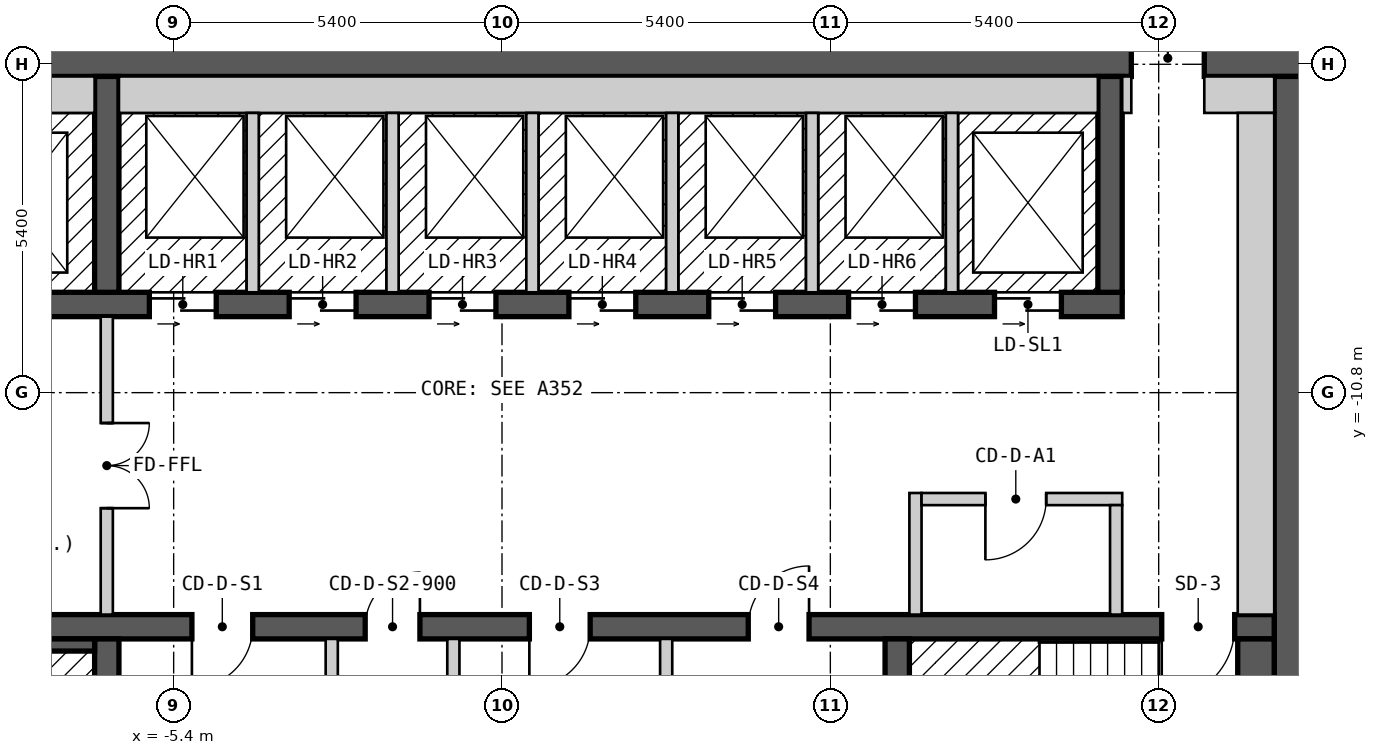
"""IFC4 building model, lengths in metres.
Left out: names, types, materials, properties, quantities, classifications, styles, units other than length and angle.
Written with IfcOpenShell. Run it as: python <this file> out.ifc"""

import sys

from ifc_helpers import new_model, si_unit, direction, frame, frame_2d, origin, place, context, subcontext, project, spatial, rectangle, extrude, element, fill, save


model = new_model("IFC4")
c1 = context("Model", 3, precision=1e-05, world=origin(), true_north=direction((0.0, 1.0)))
c2 = subcontext(c1, "Body", "Model", "MODEL_VIEW")
j1 = project(units=[si_unit("LENGTHUNIT", "METRE"), si_unit("PLANEANGLEUNIT", "RADIAN")], contexts=[c1])
p1 = place(None, origin())
s1 = spatial("IfcSite", under=j1, at=p1, CompositionType="ELEMENT")
p2 = place(p1, origin())
s2 = spatial("IfcBuilding", under=s1, at=p2, CompositionType="ELEMENT")
p3 = place(p2, frame((0.0, 0.0, 190.2)))
s3 = spatial("IfcBuildingStorey", under=s2, at=p3, CompositionType="ELEMENT", Elevation=190.2)
p4 = place(p3, frame((-13.3, -5.3, 0.0), z_axis=(0.0, 0.0, 1.0), x_axis=(1.0, 0.0, 0.0)))
e1 = element("IfcWall", 1, at=p4, inside=s3, PredefinedType="SHEAR", context=c2, shape_type="SweptSolid", body=[
    extrude(rectangle(XDim=26.6, YDim=0.6, at=frame_2d((13.3, 0.0))), origin(), (0.0, 0.0, 1.0), 2.7),
])
p5 = place(p4, frame((23.65, 0.0, 0.0)))
e2 = element("IfcOpeningElement", 2, at=p5, cuts=e1, PredefinedType="OPENING", context=c2, shape_type="SweptSolid", body=[
    extrude(rectangle(XDim=1.2, YDim=2.1, at=frame_2d((0.6, 1.05))), frame((0.0, 0.31, 0.0), z_axis=(0.0, -1.0, 0.0), x_axis=(1.0, 0.0, 0.0)), (0.0, 0.0, 1.0), 0.62),
])
p6 = place(p3, frame((13.0, -18.4, 0.0), z_axis=(0.0, 0.0, 1.0), x_axis=(0.0, 1.0, 0.0)))
e3 = element("IfcWall", 3, at=p6, inside=s3, PredefinedType="SHEAR", context=c2, shape_type="SweptSolid", body=[
    extrude(rectangle(XDim=12.8, YDim=0.6, at=frame_2d((6.4, 0.0))), origin(), (0.0, 0.0, 1.0), 2.7),
])
p7 = place(p3, frame((-12.7, -14.65, 0.0), z_axis=(0.0, 0.0, 1.0), x_axis=(1.0, 0.0, 0.0)))
e4 = element("IfcWall", 4, at=p7, inside=s3, PredefinedType="SHEAR", context=c2, shape_type="SweptSolid", body=[
    extrude(rectangle(XDim=25.4, YDim=0.4, at=frame_2d((12.7, 0.0))), origin(), (0.0, 0.0, 1.0), 2.7),
])
p8 = place(p7, frame((1.9, 0.0, 0.0), z_axis=(0.0, 0.0, 1.0), x_axis=(-1.0, 0.0, 0.0)))
e5 = element("IfcOpeningElement", 5, at=p8, cuts=e4, PredefinedType="OPENING", context=c2, shape_type="SweptSolid", body=[
    extrude(rectangle(XDim=1.2, YDim=2.1, at=frame_2d((0.6, 1.05))), frame((0.0, 0.21, 0.0), z_axis=(0.0, -1.0, 0.0), x_axis=(1.0, 0.0, 0.0)), (0.0, 0.0, 1.0), 0.42),
])
p9 = place(p7, frame((24.75, 0.0, 0.0), z_axis=(0.0, 0.0, 1.0), x_axis=(-1.0, 0.0, 0.0)))
e6 = element("IfcOpeningElement", 6, at=p9, cuts=e4, PredefinedType="OPENING", context=c2, shape_type="SweptSolid", body=[
    extrude(rectangle(XDim=1.2, YDim=2.1, at=frame_2d((0.6, 1.05))), frame((0.0, 0.21, 0.0), z_axis=(0.0, -1.0, 0.0), x_axis=(1.0, 0.0, 0.0)), (0.0, 0.0, 1.0), 0.42),
])
p10 = place(p7, frame((8.6, 0.0, 0.0), z_axis=(0.0, 0.0, 1.0), x_axis=(-1.0, 0.0, 0.0)))
e7 = element("IfcOpeningElement", 7, at=p10, cuts=e4, PredefinedType="OPENING", context=c2, shape_type="SweptSolid", body=[
    extrude(rectangle(XDim=1.0, YDim=2.1, at=frame_2d((0.5, 1.05))), frame((0.0, 0.21, 0.0), z_axis=(0.0, -1.0, 0.0), x_axis=(1.0, 0.0, 0.0)), (0.0, 0.0, 1.0), 0.42),
])
p11 = place(p7, frame((11.35, 0.0, 0.0), z_axis=(0.0, 0.0, 1.0), x_axis=(-1.0, 0.0, 0.0)))
e8 = element("IfcOpeningElement", 8, at=p11, cuts=e4, PredefinedType="OPENING", context=c2, shape_type="SweptSolid", body=[
    extrude(rectangle(XDim=0.9, YDim=2.1, at=frame_2d((0.45, 1.05))), frame((0.0, 0.21, 0.0), z_axis=(0.0, -1.0, 0.0), x_axis=(1.0, 0.0, 0.0)), (0.0, 0.0, 1.0), 0.42),
])
p12 = place(p7, frame((14.15, 0.0, 0.0), z_axis=(0.0, 0.0, 1.0), x_axis=(-1.0, 0.0, 0.0)))
e9 = element("IfcOpeningElement", 9, at=p12, cuts=e4, PredefinedType="OPENING", context=c2, shape_type="SweptSolid", body=[
    extrude(rectangle(XDim=1.0, YDim=2.1, at=frame_2d((0.5, 1.05))), frame((0.0, 0.21, 0.0), z_axis=(0.0, -1.0, 0.0), x_axis=(1.0, 0.0, 0.0)), (0.0, 0.0, 1.0), 0.42),
])
p13 = place(p7, frame((17.75, 0.0, 0.0), z_axis=(0.0, 0.0, 1.0), x_axis=(-1.0, 0.0, 0.0)))
e10 = element("IfcOpeningElement", 10, at=p13, cuts=e4, PredefinedType="OPENING", context=c2, shape_type="SweptSolid", body=[
    extrude(rectangle(XDim=1.0, YDim=2.1, at=frame_2d((0.5, 1.05))), frame((0.0, 0.21, 0.0), z_axis=(0.0, -1.0, 0.0), x_axis=(1.0, 0.0, 0.0)), (0.0, 0.0, 1.0), 0.42),
])
p14 = place(p3, frame((-12.7, -9.35, 0.0), z_axis=(0.0, 0.0, 1.0), x_axis=(1.0, 0.0, 0.0)))
e11 = element("IfcWall", 11, at=p14, inside=s3, PredefinedType="SHEAR", context=c2, shape_type="SweptSolid", body=[
    extrude(rectangle(XDim=22.9, YDim=0.4, at=frame_2d((11.45, 0.0))), origin(), (0.0, 0.0, 1.0), 2.7),
])
p15 = place(p14, frame((1.3, 0.0, 0.0)))
e12 = element("IfcOpeningElement", 12, at=p15, cuts=e11, PredefinedType="OPENING", context=c2, shape_type="SweptSolid", body=[
    extrude(rectangle(XDim=1.1, YDim=2.1, at=frame_2d((0.55, 1.05))), frame((0.0, 0.21, 0.0), z_axis=(0.0, -1.0, 0.0), x_axis=(1.0, 0.0, 0.0)), (0.0, 0.0, 1.0), 0.42),
])
p16 = place(p14, frame((4.1, 0.0, 0.0)))
e13 = element("IfcOpeningElement", 13, at=p16, cuts=e11, PredefinedType="OPENING", context=c2, shape_type="SweptSolid", body=[
    extrude(rectangle(XDim=1.1, YDim=2.1, at=frame_2d((0.55, 1.05))), frame((0.0, 0.21, 0.0), z_axis=(0.0, -1.0, 0.0), x_axis=(1.0, 0.0, 0.0)), (0.0, 0.0, 1.0), 0.42),
])
p17 = place(p14, frame((6.9, 0.0, 0.0)))
e14 = element("IfcOpeningElement", 14, at=p17, cuts=e11, PredefinedType="OPENING", context=c2, shape_type="SweptSolid", body=[
    extrude(rectangle(XDim=1.1, YDim=2.1, at=frame_2d((0.55, 1.05))), frame((0.0, 0.21, 0.0), z_axis=(0.0, -1.0, 0.0), x_axis=(1.0, 0.0, 0.0)), (0.0, 0.0, 1.0), 0.42),
])
p18 = place(p14, frame((9.2, 0.0, 0.0)))
e15 = element("IfcOpeningElement", 15, at=p18, cuts=e11, PredefinedType="OPENING", context=c2, shape_type="SweptSolid", body=[
    extrude(rectangle(XDim=1.1, YDim=2.1, at=frame_2d((0.55, 1.05))), frame((0.0, 0.21, 0.0), z_axis=(0.0, -1.0, 0.0), x_axis=(1.0, 0.0, 0.0)), (0.0, 0.0, 1.0), 0.42),
])
p19 = place(p14, frame((11.5, 0.0, 0.0)))
e16 = element("IfcOpeningElement", 16, at=p19, cuts=e11, PredefinedType="OPENING", context=c2, shape_type="SweptSolid", body=[
    extrude(rectangle(XDim=1.1, YDim=2.1, at=frame_2d((0.55, 1.05))), frame((0.0, 0.21, 0.0), z_axis=(0.0, -1.0, 0.0), x_axis=(1.0, 0.0, 0.0)), (0.0, 0.0, 1.0), 0.42),
])
p20 = place(p14, frame((13.8, 0.0, 0.0)))
e17 = element("IfcOpeningElement", 17, at=p20, cuts=e11, PredefinedType="OPENING", context=c2, shape_type="SweptSolid", body=[
    extrude(rectangle(XDim=1.1, YDim=2.1, at=frame_2d((0.55, 1.05))), frame((0.0, 0.21, 0.0), z_axis=(0.0, -1.0, 0.0), x_axis=(1.0, 0.0, 0.0)), (0.0, 0.0, 1.0), 0.42),
])
p21 = place(p14, frame((16.1, 0.0, 0.0)))
e18 = element("IfcOpeningElement", 18, at=p21, cuts=e11, PredefinedType="OPENING", context=c2, shape_type="SweptSolid", body=[
    extrude(rectangle(XDim=1.1, YDim=2.1, at=frame_2d((0.55, 1.05))), frame((0.0, 0.21, 0.0), z_axis=(0.0, -1.0, 0.0), x_axis=(1.0, 0.0, 0.0)), (0.0, 0.0, 1.0), 0.42),
])
p22 = place(p14, frame((18.4, 0.0, 0.0)))
e19 = element("IfcOpeningElement", 19, at=p22, cuts=e11, PredefinedType="OPENING", context=c2, shape_type="SweptSolid", body=[
    extrude(rectangle(XDim=1.1, YDim=2.1, at=frame_2d((0.55, 1.05))), frame((0.0, 0.21, 0.0), z_axis=(0.0, -1.0, 0.0), x_axis=(1.0, 0.0, 0.0)), (0.0, 0.0, 1.0), 0.42),
])
p23 = place(p14, frame((20.8, 0.0, 0.0)))
e20 = element("IfcOpeningElement", 20, at=p23, cuts=e11, PredefinedType="OPENING", context=c2, shape_type="SweptSolid", body=[
    extrude(rectangle(XDim=1.1, YDim=2.1, at=frame_2d((0.55, 1.05))), frame((0.0, 0.21, 0.0), z_axis=(0.0, -1.0, 0.0), x_axis=(1.0, 0.0, 0.0)), (0.0, 0.0, 1.0), 0.42),
])
for number, where, z_axis, x_axis in (
    (21, (-6.5, -18.4, 0.0), (0.0, 0.0, 1.0), (0.0, 1.0, 0.0)),
    (22, (6.5, -18.4, 0.0), (0.0, 0.0, 1.0), (0.0, 1.0, 0.0)),
    (23, (-6.5, -9.15, 0.0), (0.0, 0.0, 1.0), (0.0, 1.0, 0.0)),
    (24, (10.0, -9.15, 0.0), (0.0, 0.0, 1.0), (0.0, 1.0, 0.0)),
):
    element("IfcWall", number, at=place(p3, frame(where, z_axis=z_axis, x_axis=x_axis)), inside=s3, PredefinedType="SHEAR", context=c2, shape_type="SweptSolid", body=[
        extrude(rectangle(XDim=3.55, YDim=0.4, at=frame_2d((1.775, 0.0))), origin(), (0.0, 0.0, 1.0), 2.7),
    ])
p24 = place(p3, frame((-12.1, -5.9, 0.0), z_axis=(0.0, 0.0, 1.0), x_axis=(1.0, 0.0, 0.0)))
e25 = element("IfcWall", 25, at=p24, inside=s3, PredefinedType="SOLIDWALL", context=c2, shape_type="SweptSolid", body=[
    extrude(rectangle(XDim=5.4, YDim=0.6, at=frame_2d((2.7, 0.0))), origin(), (0.0, 0.0, 1.0), 2.7),
])
p25 = place(p3, frame((-10.8, -14.95, 0.0), z_axis=(0.0, 0.0, 1.0), x_axis=(1.0, 0.0, 0.0)))
e26 = element("IfcWall", 26, at=p25, inside=s3, PredefinedType="SOLIDWALL", context=c2, shape_type="SweptSolid", body=[
    extrude(rectangle(XDim=4.1, YDim=0.2, at=frame_2d((2.05, 0.0))), origin(), (0.0, 0.0, 1.0), 2.7),
])
p26 = place(p3, frame((-6.5, -14.45, 0.0), z_axis=(0.0, 0.0, 1.0), x_axis=(0.0, 1.0, 0.0)))
e27 = element("IfcWall", 27, at=p26, inside=s3, PredefinedType="PARTITIONING", context=c2, shape_type="SweptSolid", body=[
    extrude(rectangle(XDim=4.9, YDim=0.2, at=frame_2d((2.45, 0.0))), origin(), (0.0, 0.0, 1.0), 2.7),
])
p27 = place(p26, frame((3.15, 0.0, 0.0), z_axis=(0.0, 0.0, 1.0), x_axis=(-1.0, 0.0, 0.0)))
e28 = element("IfcOpeningElement", 28, at=p27, cuts=e27, PredefinedType="OPENING", context=c2, shape_type="SweptSolid", body=[
    extrude(rectangle(XDim=1.4, YDim=2.1, at=frame_2d((0.7, 1.05))), frame((0.0, 0.11, 0.0), z_axis=(0.0, -1.0, 0.0), x_axis=(1.0, 0.0, 0.0)), (0.0, 0.0, 1.0), 0.22),
])
p28 = place(p3, frame((-6.3, -5.9, 0.0), z_axis=(0.0, 0.0, 1.0), x_axis=(1.0, 0.0, 0.0)))
e29 = element("IfcWall", 29, at=p28, inside=s3, PredefinedType="SOLIDWALL", context=c2, shape_type="SweptSolid", body=[
    extrude(rectangle(XDim=16.1, YDim=0.6, at=frame_2d((8.05, 0.0))), origin(), (0.0, 0.0, 1.0), 2.7),
])
p29 = place(p3, frame((-4.1, -9.15, 0.0), z_axis=(0.0, 0.0, 1.0), x_axis=(0.0, 1.0, 0.0)))
e30 = element("IfcWall", 30, at=p29, inside=s3, PredefinedType="SOLIDWALL", context=c2, shape_type="SweptSolid", body=[
    extrude(rectangle(XDim=2.95, YDim=0.2, at=frame_2d((1.475, 0.0))), origin(), (0.0, 0.0, 1.0), 2.7),
])
p30 = place(p3, frame((-2.8, -17.8, 0.0), z_axis=(0.0, 0.0, 1.0), x_axis=(0.0, 1.0, 0.0)))
e31 = element("IfcWall", 31, at=p30, inside=s3, PredefinedType="PARTITIONING", context=c2, shape_type="SweptSolid", body=[
    extrude(rectangle(XDim=2.95, YDim=0.2, at=frame_2d((1.475, 0.0))), origin(), (0.0, 0.0, 1.0), 2.7),
])
p31 = place(p3, frame((-1.8, -9.15, 0.0), z_axis=(0.0, 0.0, 1.0), x_axis=(0.0, 1.0, 0.0)))
e32 = element("IfcWall", 32, at=p31, inside=s3, PredefinedType="SOLIDWALL", context=c2, shape_type="SweptSolid", body=[
    extrude(rectangle(XDim=2.95, YDim=0.2, at=frame_2d((1.475, 0.0))), origin(), (0.0, 0.0, 1.0), 2.7),
])
p32 = place(p3, frame((-0.8, -17.8, 0.0), z_axis=(0.0, 0.0, 1.0), x_axis=(0.0, 1.0, 0.0)))
e33 = element("IfcWall", 33, at=p32, inside=s3, PredefinedType="PARTITIONING", context=c2, shape_type="SweptSolid", body=[
    extrude(rectangle(XDim=2.95, YDim=0.2, at=frame_2d((1.475, 0.0))), origin(), (0.0, 0.0, 1.0), 2.7),
])
p33 = place(p3, frame((0.5, -9.15, 0.0), z_axis=(0.0, 0.0, 1.0), x_axis=(0.0, 1.0, 0.0)))
e34 = element("IfcWall", 34, at=p33, inside=s3, PredefinedType="SOLIDWALL", context=c2, shape_type="SweptSolid", body=[
    extrude(rectangle(XDim=2.95, YDim=0.2, at=frame_2d((1.475, 0.0))), origin(), (0.0, 0.0, 1.0), 2.7),
])
p34 = place(p3, frame((2.7, -17.8, 0.0), z_axis=(0.0, 0.0, 1.0), x_axis=(0.0, 1.0, 0.0)))
e35 = element("IfcWall", 35, at=p34, inside=s3, PredefinedType="PARTITIONING", context=c2, shape_type="SweptSolid", body=[
    extrude(rectangle(XDim=2.95, YDim=0.2, at=frame_2d((1.475, 0.0))), origin(), (0.0, 0.0, 1.0), 2.7),
])
for number, where, z_axis, x_axis in (
    (36, (2.8, -9.15, 0.0), (0.0, 0.0, 1.0), (0.0, 1.0, 0.0)),
    (37, (5.1, -9.15, 0.0), (0.0, 0.0, 1.0), (0.0, 1.0, 0.0)),
):
    element("IfcWall", number, at=place(p3, frame(where, z_axis=z_axis, x_axis=x_axis)), inside=s3, PredefinedType="SOLIDWALL", context=c2, shape_type="SweptSolid", body=[
        extrude(rectangle(XDim=2.95, YDim=0.2, at=frame_2d((1.475, 0.0))), origin(), (0.0, 0.0, 1.0), 2.7),
    ])
p35 = place(p3, frame((6.8, -14.45, 0.0), z_axis=(0.0, 0.0, 1.0), x_axis=(0.0, 1.0, 0.0)))
e38 = element("IfcWall", 38, at=p35, inside=s3, PredefinedType="PARTITIONING", context=c2, shape_type="SweptSolid", body=[
    extrude(rectangle(XDim=2.0, YDim=0.2, at=frame_2d((1.0, 0.0))), origin(), (0.0, 0.0, 1.0), 2.7),
])
p36 = place(p3, frame((6.9, -12.55, 0.0), z_axis=(0.0, 0.0, 1.0), x_axis=(1.0, 0.0, 0.0)))
e39 = element("IfcWall", 39, at=p36, inside=s3, PredefinedType="PARTITIONING", context=c2, shape_type="SweptSolid", body=[
    extrude(rectangle(XDim=3.3, YDim=0.2, at=frame_2d((1.65, 0.0))), origin(), (0.0, 0.0, 1.0), 2.7),
])
p37 = place(p36, frame((2.05, 0.0, 0.0), z_axis=(0.0, 0.0, 1.0), x_axis=(-1.0, 0.0, 0.0)))
e40 = element("IfcOpeningElement", 40, at=p37, cuts=e39, PredefinedType="OPENING", context=c2, shape_type="SweptSolid", body=[
    extrude(rectangle(XDim=1.0, YDim=2.1, at=frame_2d((0.5, 1.05))), frame((0.0, 0.11, 0.0), z_axis=(0.0, -1.0, 0.0), x_axis=(1.0, 0.0, 0.0)), (0.0, 0.0, 1.0), 0.22),
])
p38 = place(p3, frame((7.4, -9.15, 0.0), z_axis=(0.0, 0.0, 1.0), x_axis=(0.0, 1.0, 0.0)))
e41 = element("IfcWall", 41, at=p38, inside=s3, PredefinedType="SOLIDWALL", context=c2, shape_type="SweptSolid", body=[
    extrude(rectangle(XDim=2.95, YDim=0.2, at=frame_2d((1.475, 0.0))), origin(), (0.0, 0.0, 1.0), 2.7),
])
p39 = place(p3, frame((10.1, -14.45, 0.0), z_axis=(0.0, 0.0, 1.0), x_axis=(0.0, 1.0, 0.0)))
e42 = element("IfcWall", 42, at=p39, inside=s3, PredefinedType="PARTITIONING", context=c2, shape_type="SweptSolid", body=[
    extrude(rectangle(XDim=1.8, YDim=0.2, at=frame_2d((0.9, 0.0))), origin(), (0.0, 0.0, 1.0), 2.7),
])
p40 = place(p3, frame((10.275, -6.2, 0.0), z_axis=(0.0, 0.0, 1.0), x_axis=(0.0, 1.0, 0.0)))
e43 = element("IfcWall", 43, at=p40, inside=s3, PredefinedType="PARTITIONING", context=c2, shape_type="SweptSolid", body=[
    extrude(rectangle(XDim=0.6, YDim=0.15, at=frame_2d((0.3, 0.0))), origin(), (0.0, 0.0, 1.0), 2.7),
])
p41 = place(p3, frame((11.55, -5.9, 0.0), z_axis=(0.0, 0.0, 1.0), x_axis=(1.0, 0.0, 0.0)))
e44 = element("IfcWall", 44, at=p41, inside=s3, PredefinedType="PARTITIONING", context=c2, shape_type="SweptSolid", body=[
    extrude(rectangle(XDim=1.15, YDim=0.6, at=frame_2d((0.575, 0.0))), origin(), (0.0, 0.0, 1.0), 2.7),
])
p42 = place(p3, frame((12.4, -17.6, 0.0), z_axis=(0.0, 0.0, 1.0), x_axis=(0.0, 1.0, 0.0)))
e45 = element("IfcWall", 45, at=p42, inside=s3, PredefinedType="SOLIDWALL", context=c2, shape_type="SweptSolid", body=[
    extrude(rectangle(XDim=2.75, YDim=0.6, at=frame_2d((1.375, 0.0))), origin(), (0.0, 0.0, 1.0), 2.7),
])
p43 = place(p3, frame((12.4, -14.45, 0.0), z_axis=(0.0, 0.0, 1.0), x_axis=(0.0, 1.0, 0.0)))
e46 = element("IfcWall", 46, at=p43, inside=s3, PredefinedType="PARTITIONING", context=c2, shape_type="SweptSolid", body=[
    extrude(rectangle(XDim=8.25, YDim=0.6, at=frame_2d((4.125, 0.0))), origin(), (0.0, 0.0, 1.0), 2.7),
])
p44 = place(p17, origin())
e47 = element("IfcDoor", 47, at=p44, inside=s3, OperationType="DOUBLE_DOOR_SLIDING", PredefinedType="DOOR", context=c2, shape_type="SweptSolid", body=[
    extrude(rectangle(XDim=1.1, YDim=2.1, at=frame_2d((0.55, 1.05))), frame((0.0, 0.025, 0.0), z_axis=(0.0, -1.0, 0.0), x_axis=(1.0, 0.0, 0.0)), (0.0, 0.0, 1.0), 0.05),
])
fill(e14, e47)
p45 = place(p18, origin())
e48 = element("IfcDoor", 48, at=p45, inside=s3, OperationType="DOUBLE_DOOR_SLIDING", PredefinedType="DOOR", context=c2, shape_type="SweptSolid", body=[
    extrude(rectangle(XDim=1.1, YDim=2.1, at=frame_2d((0.55, 1.05))), frame((0.0, 0.025, 0.0), z_axis=(0.0, -1.0, 0.0), x_axis=(1.0, 0.0, 0.0)), (0.0, 0.0, 1.0), 0.05),
])
fill(e15, e48)
p46 = place(p19, origin())
e49 = element("IfcDoor", 49, at=p46, inside=s3, OperationType="DOUBLE_DOOR_SLIDING", PredefinedType="DOOR", context=c2, shape_type="SweptSolid", body=[
    extrude(rectangle(XDim=1.1, YDim=2.1, at=frame_2d((0.55, 1.05))), frame((0.0, 0.025, 0.0), z_axis=(0.0, -1.0, 0.0), x_axis=(1.0, 0.0, 0.0)), (0.0, 0.0, 1.0), 0.05),
])
fill(e16, e49)
p47 = place(p20, origin())
e50 = element("IfcDoor", 50, at=p47, inside=s3, OperationType="DOUBLE_DOOR_SLIDING", PredefinedType="DOOR", context=c2, shape_type="SweptSolid", body=[
    extrude(rectangle(XDim=1.1, YDim=2.1, at=frame_2d((0.55, 1.05))), frame((0.0, 0.025, 0.0), z_axis=(0.0, -1.0, 0.0), x_axis=(1.0, 0.0, 0.0)), (0.0, 0.0, 1.0), 0.05),
])
fill(e17, e50)
p48 = place(p21, origin())
e51 = element("IfcDoor", 51, at=p48, inside=s3, OperationType="DOUBLE_DOOR_SLIDING", PredefinedType="DOOR", context=c2, shape_type="SweptSolid", body=[
    extrude(rectangle(XDim=1.1, YDim=2.1, at=frame_2d((0.55, 1.05))), frame((0.0, 0.025, 0.0), z_axis=(0.0, -1.0, 0.0), x_axis=(1.0, 0.0, 0.0)), (0.0, 0.0, 1.0), 0.05),
])
fill(e18, e51)
p49 = place(p22, origin())
e52 = element("IfcDoor", 52, at=p49, inside=s3, OperationType="DOUBLE_DOOR_SLIDING", PredefinedType="DOOR", context=c2, shape_type="SweptSolid", body=[
    extrude(rectangle(XDim=1.1, YDim=2.1, at=frame_2d((0.55, 1.05))), frame((0.0, 0.025, 0.0), z_axis=(0.0, -1.0, 0.0), x_axis=(1.0, 0.0, 0.0)), (0.0, 0.0, 1.0), 0.05),
])
fill(e19, e52)
p50 = place(p23, origin())
e53 = element("IfcDoor", 53, at=p50, inside=s3, OperationType="DOUBLE_DOOR_SLIDING", PredefinedType="DOOR", context=c2, shape_type="SweptSolid", body=[
    extrude(rectangle(XDim=1.1, YDim=2.1, at=frame_2d((0.55, 1.05))), frame((0.0, 0.025, 0.0), z_axis=(0.0, -1.0, 0.0), x_axis=(1.0, 0.0, 0.0)), (0.0, 0.0, 1.0), 0.05),
])
fill(e20, e53)
p51 = place(p9, origin())
e54 = element("IfcDoor", 54, at=p51, inside=s3, OperationType="SINGLE_SWING_RIGHT", PredefinedType="DOOR", context=c2, shape_type="SweptSolid", body=[
    extrude(rectangle(XDim=1.2, YDim=2.1, at=frame_2d((0.6, 1.05))), frame((0.0, 0.025, 0.0), z_axis=(0.0, -1.0, 0.0), x_axis=(1.0, 0.0, 0.0)), (0.0, 0.0, 1.0), 0.05),
])
fill(e6, e54)
p52 = place(p27, origin())
e55 = element("IfcDoor", 55, at=p52, inside=s3, OperationType="DOUBLE_DOOR_SINGLE_SWING", PredefinedType="DOOR", context=c2, shape_type="SweptSolid", body=[
    extrude(rectangle(XDim=1.4, YDim=2.1, at=frame_2d((0.7, 1.05))), frame((0.0, 0.025, 0.0), z_axis=(0.0, -1.0, 0.0), x_axis=(1.0, 0.0, 0.0)), (0.0, 0.0, 1.0), 0.05),
])
fill(e28, e55)
p53 = place(p5, origin())
e56 = element("IfcDoor", 56, at=p53, inside=s3, OperationType="DOUBLE_DOOR_SINGLE_SWING", PredefinedType="DOOR", context=c2, shape_type="SweptSolid", body=[
    extrude(rectangle(XDim=1.2, YDim=2.1, at=frame_2d((0.6, 1.05))), frame((0.0, 0.025, 0.0), z_axis=(0.0, -1.0, 0.0), x_axis=(1.0, 0.0, 0.0)), (0.0, 0.0, 1.0), 0.05),
])
fill(e2, e56)
p54 = place(p37, origin())
e57 = element("IfcDoor", 57, at=p54, inside=s3, OperationType="SINGLE_SWING_RIGHT", PredefinedType="DOOR", context=c2, shape_type="SweptSolid", body=[
    extrude(rectangle(XDim=1.0, YDim=2.1, at=frame_2d((0.5, 1.05))), frame((0.0, 0.025, 0.0), z_axis=(0.0, -1.0, 0.0), x_axis=(1.0, 0.0, 0.0)), (0.0, 0.0, 1.0), 0.05),
])
fill(e40, e57)
p55 = place(p10, origin())
e58 = element("IfcDoor", 58, at=p55, inside=s3, OperationType="SINGLE_SWING_RIGHT", PredefinedType="DOOR", context=c2, shape_type="SweptSolid", body=[
    extrude(rectangle(XDim=1.0, YDim=2.1, at=frame_2d((0.5, 1.05))), frame((0.0, 0.025, 0.0), z_axis=(0.0, -1.0, 0.0), x_axis=(1.0, 0.0, 0.0)), (0.0, 0.0, 1.0), 0.05),
])
fill(e7, e58)
p56 = place(p11, origin())
e59 = element("IfcDoor", 59, at=p56, inside=s3, OperationType="SINGLE_SWING_LEFT", PredefinedType="DOOR", context=c2, shape_type="SweptSolid", body=[
    extrude(rectangle(XDim=0.9, YDim=2.1, at=frame_2d((0.45, 1.05))), frame((0.0, 0.025, 0.0), z_axis=(0.0, -1.0, 0.0), x_axis=(1.0, 0.0, 0.0)), (0.0, 0.0, 1.0), 0.05),
])
fill(e8, e59)
p57 = place(p12, origin())
e60 = element("IfcDoor", 60, at=p57, inside=s3, OperationType="SINGLE_SWING_RIGHT", PredefinedType="DOOR", context=c2, shape_type="SweptSolid", body=[
    extrude(rectangle(XDim=1.0, YDim=2.1, at=frame_2d((0.5, 1.05))), frame((0.0, 0.025, 0.0), z_axis=(0.0, -1.0, 0.0), x_axis=(1.0, 0.0, 0.0)), (0.0, 0.0, 1.0), 0.05),
])
fill(e9, e60)
p58 = place(p13, origin())
e61 = element("IfcDoor", 61, at=p58, inside=s3, OperationType="SINGLE_SWING_LEFT", PredefinedType="DOOR", context=c2, shape_type="SweptSolid", body=[
    extrude(rectangle(XDim=1.0, YDim=2.1, at=frame_2d((0.5, 1.05))), frame((0.0, 0.025, 0.0), z_axis=(0.0, -1.0, 0.0), x_axis=(1.0, 0.0, 0.0)), (0.0, 0.0, 1.0), 0.05),
])
fill(e10, e61)
save(model, sys.argv[1])
